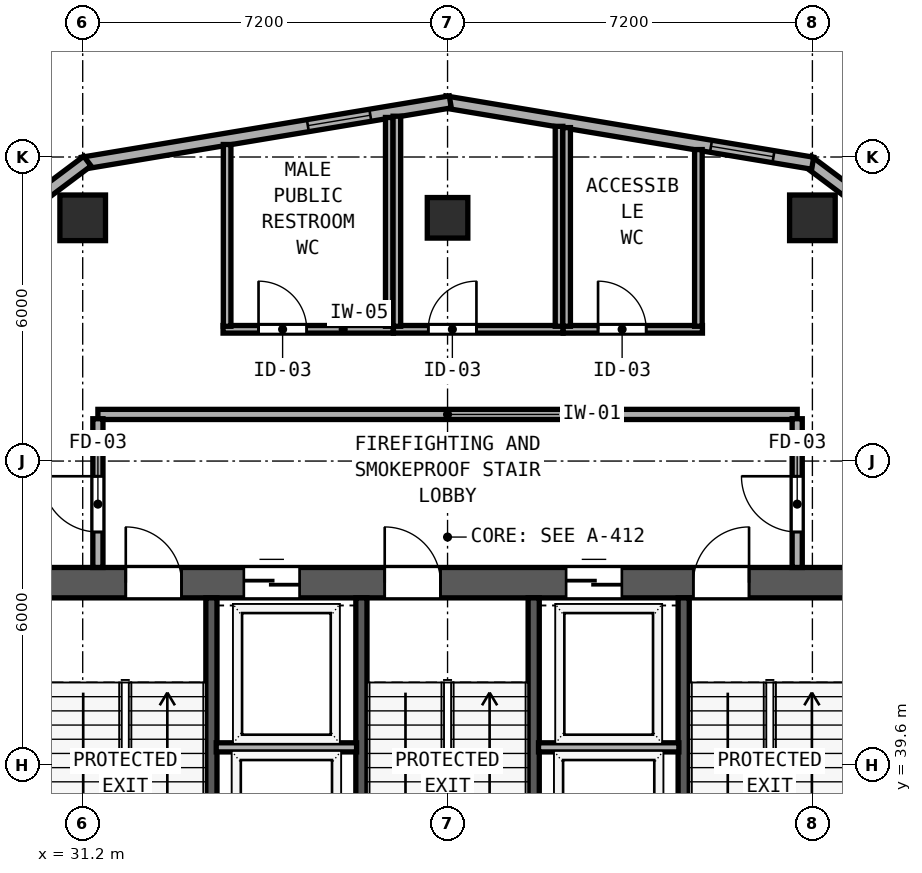
"""IFC4 building model, lengths in metres.
Left out: names, types, materials, properties, quantities, classifications, styles, units other than length and angle.
Written with IfcOpenShell. Run it as: python <this file> out.ifc"""

import sys

from ifc_helpers import new_model, si_unit, direction, frame, frame_2d, origin, origin_2d, place, context, subcontext, project, spatial, rectangle, hollow_rectangle, extrude, element, fill, save


model = new_model("IFC4")
c1 = context("Model", 3, precision=1e-05, world=origin(), true_north=direction((0.0, 1.0)))
c2 = subcontext(c1, "Body", "Model", "MODEL_VIEW")
j1 = project(units=[si_unit("LENGTHUNIT", "METRE"), si_unit("PLANEANGLEUNIT", "RADIAN")], contexts=[c1])
p1 = place(None, origin())
s1 = spatial("IfcSite", under=j1, at=p1, CompositionType="ELEMENT")
p2 = place(p1, origin())
s2 = spatial("IfcBuilding", under=s1, at=p2, CompositionType="ELEMENT")
p3 = place(p2, frame((0.0, 0.0, 164.6)))
s3 = spatial("IfcBuildingStorey", under=s2, at=p3, CompositionType="ELEMENT", Elevation=164.6)
p4 = place(p3, frame((29.7, 43.2, 0.0), z_axis=(0.0, 0.0, 1.0), x_axis=(1.0, 0.0, 0.0)))
e1 = element("IfcWall", 1, at=p4, inside=s3, PredefinedType="SHEAR", context=c2, shape_type="SweptSolid", body=[
    extrude(rectangle(XDim=17.4, YDim=0.6, at=frame_2d((8.7, 0.0))), origin(), (0.0, 0.0, 1.0), 4.22),
])
p5 = place(p4, frame((2.35, 0.0, 0.0)))
e2 = element("IfcOpeningElement", 2, at=p5, cuts=e1, PredefinedType="OPENING", context=c2, shape_type="SweptSolid", body=[
    extrude(rectangle(XDim=1.1, YDim=2.15, at=frame_2d((0.55, 1.075))), frame((0.0, 0.31, 0.0), z_axis=(0.0, -1.0, 0.0), x_axis=(1.0, 0.0, 0.0)), (0.0, 0.0, 1.0), 0.62),
])
p6 = place(p4, frame((7.46, 0.0, 0.0)))
e3 = element("IfcOpeningElement", 3, at=p6, cuts=e1, PredefinedType="OPENING", context=c2, shape_type="SweptSolid", body=[
    extrude(rectangle(XDim=1.1, YDim=2.15, at=frame_2d((0.55, 1.075))), frame((0.0, 0.31, 0.0), z_axis=(0.0, -1.0, 0.0), x_axis=(1.0, 0.0, 0.0)), (0.0, 0.0, 1.0), 0.62),
])
p7 = place(p4, frame((13.55, 0.0, 0.0)))
e4 = element("IfcOpeningElement", 4, at=p7, cuts=e1, PredefinedType="OPENING", context=c2, shape_type="SweptSolid", body=[
    extrude(rectangle(XDim=1.1, YDim=2.15, at=frame_2d((0.55, 1.075))), frame((0.0, 0.31, 0.0), z_axis=(0.0, -1.0, 0.0), x_axis=(1.0, 0.0, 0.0)), (0.0, 0.0, 1.0), 0.62),
])
p8 = place(p4, frame((4.68, 0.0, 0.0)))
e5 = element("IfcOpeningElement", 5, at=p8, cuts=e1, PredefinedType="OPENING", context=c2, shape_type="SweptSolid", body=[
    extrude(rectangle(XDim=1.1, YDim=2.2, at=frame_2d((0.55, 1.1))), frame((0.0, 0.31, 0.0), z_axis=(0.0, -1.0, 0.0), x_axis=(1.0, 0.0, 0.0)), (0.0, 0.0, 1.0), 0.62),
])
p9 = place(p4, frame((11.04, 0.0, 0.0)))
e6 = element("IfcOpeningElement", 6, at=p9, cuts=e1, PredefinedType="OPENING", context=c2, shape_type="SweptSolid", body=[
    extrude(rectangle(XDim=1.1, YDim=2.2, at=frame_2d((0.55, 1.1))), frame((0.0, 0.31, 0.0), z_axis=(0.0, -1.0, 0.0), x_axis=(1.0, 0.0, 0.0)), (0.0, 0.0, 1.0), 0.62),
])
for number, where, z_axis, x_axis in (
    (7, (33.74, 35.39, 0.0), (0.0, 0.0, 1.0), (0.0, 1.0, 0.0)),
    (8, (36.7, 35.39, 0.0), (0.0, 0.0, 1.0), (0.0, 1.0, 0.0)),
    (9, (40.1, 35.39, 0.0), (0.0, 0.0, 1.0), (0.0, 1.0, 0.0)),
    (10, (43.06, 35.39, 0.0), (0.0, 0.0, 1.0), (0.0, 1.0, 0.0)),
):
    element("IfcWall", number, at=place(p3, frame(where, z_axis=z_axis, x_axis=x_axis)), inside=s3, PredefinedType="SHEAR", context=c2, shape_type="SweptSolid", body=[
        extrude(rectangle(XDim=7.51, YDim=0.22, at=frame_2d((3.755, 0.0))), origin(), (0.0, 0.0, 1.0), 4.22),
    ])
for number, where, z_axis, x_axis in (
    (11, (31.2, 50.4, 0.0), (0.0, 0.0, 1.0), (1.0, 0.0, 0.0)),
    (12, (45.6, 50.4, 0.0), (0.0, 0.0, 1.0), (1.0, 0.0, 0.0)),
):
    element("IfcColumn", number, at=place(p3, frame(where, z_axis=z_axis, x_axis=x_axis)), inside=s3, PredefinedType="COLUMN", context=c2, shape_type="SweptSolid", body=[
        extrude(hollow_rectangle(XDim=0.9, YDim=0.9, WallThickness=0.034, at=origin_2d()), origin(), (0.0, 0.0, 1.0), 4.4),
    ])
p10 = place(p3, frame((38.4, 50.4, 0.0), z_axis=(0.0, 0.0, 1.0), x_axis=(1.0, 0.0, 0.0)))
e13 = element("IfcColumn", 13, at=p10, inside=s3, PredefinedType="COLUMN", context=c2, shape_type="SweptSolid", body=[
    extrude(hollow_rectangle(XDim=0.8, YDim=0.8, WallThickness=0.03, at=origin_2d()), origin(), (0.0, 0.0, 1.0), 4.4),
])
p11 = place(p3, frame((50.324, 47.907, 0.0), z_axis=(0.0, 0.0, 1.0), x_axis=(-0.80001459783, 0.599980535734, 0.0)))
e14 = element("IfcWall", 14, at=p11, inside=s3, PredefinedType="SOLIDWALL", context=c2, shape_type="SweptSolid", body=[
    extrude(rectangle(XDim=6.021, YDim=0.24, at=frame_2d((3.01, 0.0))), origin(), (0.0, 0.0, 1.0), 4.22),
])
p12 = place(p11, frame((1.6, 0.0, 0.85)))
e15 = element("IfcOpeningElement", 15, at=p12, cuts=e14, PredefinedType="OPENING", context=c2, shape_type="SweptSolid", body=[
    extrude(rectangle(XDim=1.25, YDim=1.95, at=frame_2d((0.625, 0.975))), frame((0.0, 0.13, 0.0), z_axis=(0.0, -1.0, 0.0), x_axis=(1.0, 0.0, 0.0)), (0.0, 0.0, 1.0), 0.26),
])
p13 = place(p3, frame((45.606, 51.477, 0.0), z_axis=(0.0, 0.0, 1.0), x_axis=(-0.986394820321, 0.164393608283, 0.0)))
e16 = element("IfcWall", 16, at=p13, inside=s3, PredefinedType="SOLIDWALL", context=c2, shape_type="SweptSolid", body=[
    extrude(rectangle(XDim=7.36, YDim=0.24, at=frame_2d((3.68, 0.0))), origin(), (0.0, 0.0, 1.0), 4.22),
])
p14 = place(p13, frame((0.784, 0.0, 0.85)))
e17 = element("IfcOpeningElement", 17, at=p14, cuts=e16, PredefinedType="OPENING", context=c2, shape_type="SweptSolid", body=[
    extrude(rectangle(XDim=1.25, YDim=1.95, at=frame_2d((0.625, 0.975))), frame((0.0, 0.13, 0.0), z_axis=(0.0, -1.0, 0.0), x_axis=(1.0, 0.0, 0.0)), (0.0, 0.0, 1.0), 0.26),
])
p15 = place(p3, frame((38.454, 52.687, 0.0), z_axis=(0.0, 0.0, 1.0), x_axis=(-0.986394820321, -0.164393608283, 0.0)))
e18 = element("IfcWall", 18, at=p15, inside=s3, PredefinedType="SOLIDWALL", context=c2, shape_type="SweptSolid", body=[
    extrude(rectangle(XDim=7.36, YDim=0.24, at=frame_2d((3.68, 0.0))), origin(), (0.0, 0.0, 1.0), 4.22),
])
p16 = place(p15, frame((1.6, 0.0, 0.85)))
e19 = element("IfcOpeningElement", 19, at=p16, cuts=e18, PredefinedType="OPENING", context=c2, shape_type="SweptSolid", body=[
    extrude(rectangle(XDim=1.25, YDim=1.95, at=frame_2d((0.625, 0.975))), frame((0.0, 0.13, 0.0), z_axis=(0.0, -1.0, 0.0), x_axis=(1.0, 0.0, 0.0)), (0.0, 0.0, 1.0), 0.26),
])
p17 = place(p3, frame((31.292, 51.519, 0.0), z_axis=(0.0, 0.0, 1.0), x_axis=(-0.8, -0.6, 0.0)))
e20 = element("IfcWall", 20, at=p17, inside=s3, PredefinedType="SOLIDWALL", context=c2, shape_type="SweptSolid", body=[
    extrude(rectangle(XDim=6.021, YDim=0.24, at=frame_2d((3.01, 0.0))), origin(), (0.0, 0.0, 1.0), 4.22),
])
p18 = place(p17, frame((1.6, 0.0, 0.85)))
e21 = element("IfcOpeningElement", 21, at=p18, cuts=e20, PredefinedType="OPENING", context=c2, shape_type="SweptSolid", body=[
    extrude(rectangle(XDim=1.25, YDim=1.95, at=frame_2d((0.625, 0.975))), frame((0.0, 0.13, 0.0), z_axis=(0.0, -1.0, 0.0), x_axis=(1.0, 0.0, 0.0)), (0.0, 0.0, 1.0), 0.26),
])
p19 = place(p3, frame((31.5, 46.52, 0.0), z_axis=(0.0, 0.0, 1.0), x_axis=(1.0, 0.0, 0.0)))
e22 = element("IfcWall", 22, at=p19, inside=s3, PredefinedType="SOLIDWALL", context=c2, shape_type="SweptSolid", body=[
    extrude(rectangle(XDim=13.8, YDim=0.2, at=frame_2d((6.9, 0.0))), origin(), (0.0, 0.0, 1.0), 4.22),
])
p20 = place(p3, frame((31.5, 43.5, 0.0), z_axis=(0.0, 0.0, 1.0), x_axis=(0.0, 1.0, 0.0)))
e23 = element("IfcWall", 23, at=p20, inside=s3, PredefinedType="SOLIDWALL", context=c2, shape_type="SweptSolid", body=[
    extrude(rectangle(XDim=2.935, YDim=0.2, at=frame_2d((1.468, 0.0))), origin(), (0.0, 0.0, 1.0), 4.22),
])
p21 = place(p20, frame((1.8, 0.0, 0.0), z_axis=(0.0, 0.0, 1.0), x_axis=(-1.0, 0.0, 0.0)))
e24 = element("IfcOpeningElement", 24, at=p21, cuts=e23, PredefinedType="OPENING", context=c2, shape_type="SweptSolid", body=[
    extrude(rectangle(XDim=1.1, YDim=2.15, at=frame_2d((0.55, 1.075))), frame((0.0, 0.11, 0.0), z_axis=(0.0, -1.0, 0.0), x_axis=(1.0, 0.0, 0.0)), (0.0, 0.0, 1.0), 0.22),
])
p22 = place(p3, frame((45.3, 43.5, 0.0), z_axis=(0.0, 0.0, 1.0), x_axis=(0.0, 1.0, 0.0)))
e25 = element("IfcWall", 25, at=p22, inside=s3, PredefinedType="SOLIDWALL", context=c2, shape_type="SweptSolid", body=[
    extrude(rectangle(XDim=2.935, YDim=0.2, at=frame_2d((1.468, 0.0))), origin(), (0.0, 0.0, 1.0), 4.22),
])
p23 = place(p22, frame((0.7, 0.0, 0.0)))
e26 = element("IfcOpeningElement", 26, at=p23, cuts=e25, PredefinedType="OPENING", context=c2, shape_type="SweptSolid", body=[
    extrude(rectangle(XDim=1.1, YDim=2.15, at=frame_2d((0.55, 1.075))), frame((0.0, 0.11, 0.0), z_axis=(0.0, -1.0, 0.0), x_axis=(1.0, 0.0, 0.0)), (0.0, 0.0, 1.0), 0.22),
])
for number, where, z_axis, x_axis in (
    (27, (33.835, 39.95, 0.0), (0.0, 0.0, 1.0), (1.0, 0.0, 0.0)),
    (28, (40.195, 39.95, 0.0), (0.0, 0.0, 1.0), (1.0, 0.0, 0.0)),
):
    element("IfcWall", number, at=place(p3, frame(where, z_axis=z_axis, x_axis=x_axis)), inside=s3, PredefinedType="SOLIDWALL", context=c2, shape_type="SweptSolid", body=[
        extrude(rectangle(XDim=2.77, YDim=0.18, at=frame_2d((1.385, 0.0))), origin(), (0.0, 0.0, 1.0), 4.22),
    ])
p24 = place(p3, frame((33.97, 48.2, 0.0), z_axis=(0.0, 0.0, 1.0), x_axis=(1.0, 0.0, 0.0)))
e29 = element("IfcWall", 29, at=p24, inside=s3, PredefinedType="PARTITIONING", context=c2, shape_type="SweptSolid", body=[
    extrude(rectangle(XDim=3.36, YDim=0.15, at=frame_2d((1.68, 0.0))), origin(), (0.0, 0.0, 1.0), 4.22),
])
p25 = place(p24, frame((0.7, 0.0, 0.0)))
e30 = element("IfcOpeningElement", 30, at=p25, cuts=e29, PredefinedType="OPENING", context=c2, shape_type="SweptSolid", body=[
    extrude(rectangle(XDim=0.95, YDim=2.12, at=frame_2d((0.475, 1.06))), frame((0.0, 0.085, 0.0), z_axis=(0.0, -1.0, 0.0), x_axis=(1.0, 0.0, 0.0)), (0.0, 0.0, 1.0), 0.17),
])
p26 = place(p3, frame((34.05, 48.26, 0.0), z_axis=(0.0, 0.0, 1.0), x_axis=(0.0, 1.0, 0.0)))
e31 = element("IfcWall", 31, at=p26, inside=s3, PredefinedType="PARTITIONING", context=c2, shape_type="SweptSolid", body=[
    extrude(rectangle(XDim=3.587, YDim=0.15, at=frame_2d((1.793, 0.0))), origin(), (0.0, 0.0, 1.0), 4.22),
])
p27 = place(p3, frame((37.25, 48.26, 0.0), z_axis=(0.0, 0.0, 1.0), x_axis=(0.0, 1.0, 0.0)))
e32 = element("IfcWall", 32, at=p27, inside=s3, PredefinedType="PARTITIONING", context=c2, shape_type="SweptSolid", body=[
    extrude(rectangle(XDim=4.12, YDim=0.15, at=frame_2d((2.06, 0.0))), origin(), (0.0, 0.0, 1.0), 4.22),
])
p28 = place(p3, frame((37.332, 48.2, 0.0), z_axis=(0.0, 0.0, 1.0), x_axis=(1.0, 0.0, 0.0)))
e33 = element("IfcWall", 33, at=p28, inside=s3, PredefinedType="PARTITIONING", context=c2, shape_type="SweptSolid", body=[
    extrude(rectangle(XDim=3.348, YDim=0.15, at=frame_2d((1.674, 0.0))), origin(), (0.0, 0.0, 1.0), 4.22),
])
p29 = place(p28, frame((0.688, 0.0, 0.0)))
e34 = element("IfcOpeningElement", 34, at=p29, cuts=e33, PredefinedType="OPENING", context=c2, shape_type="SweptSolid", body=[
    extrude(rectangle(XDim=0.95, YDim=2.12, at=frame_2d((0.475, 1.06))), frame((0.0, 0.085, 0.0), z_axis=(0.0, -1.0, 0.0), x_axis=(1.0, 0.0, 0.0)), (0.0, 0.0, 1.0), 0.17),
])
p30 = place(p3, frame((37.4, 48.26, 0.0), z_axis=(0.0, 0.0, 1.0), x_axis=(0.0, 1.0, 0.0)))
e35 = element("IfcWall", 35, at=p30, inside=s3, PredefinedType="PARTITIONING", context=c2, shape_type="SweptSolid", body=[
    extrude(rectangle(XDim=4.145, YDim=0.15, at=frame_2d((2.073, 0.0))), origin(), (0.0, 0.0, 1.0), 4.22),
])
p31 = place(p3, frame((40.6, 48.26, 0.0), z_axis=(0.0, 0.0, 1.0), x_axis=(0.0, 1.0, 0.0)))
e36 = element("IfcWall", 36, at=p31, inside=s3, PredefinedType="PARTITIONING", context=c2, shape_type="SweptSolid", body=[
    extrude(rectangle(XDim=3.945, YDim=0.15, at=frame_2d((1.973, 0.0))), origin(), (0.0, 0.0, 1.0), 4.22),
])
p32 = place(p3, frame((40.682, 48.2, 0.0), z_axis=(0.0, 0.0, 1.0), x_axis=(1.0, 0.0, 0.0)))
e37 = element("IfcWall", 37, at=p32, inside=s3, PredefinedType="PARTITIONING", context=c2, shape_type="SweptSolid", body=[
    extrude(rectangle(XDim=2.748, YDim=0.15, at=frame_2d((1.374, 0.0))), origin(), (0.0, 0.0, 1.0), 4.22),
])
p33 = place(p32, frame((0.688, 0.0, 0.0)))
e38 = element("IfcOpeningElement", 38, at=p33, cuts=e37, PredefinedType="OPENING", context=c2, shape_type="SweptSolid", body=[
    extrude(rectangle(XDim=0.95, YDim=2.12, at=frame_2d((0.475, 1.06))), frame((0.0, 0.085, 0.0), z_axis=(0.0, -1.0, 0.0), x_axis=(1.0, 0.0, 0.0)), (0.0, 0.0, 1.0), 0.17),
])
p34 = place(p3, frame((40.75, 48.26, 0.0), z_axis=(0.0, 0.0, 1.0), x_axis=(0.0, 1.0, 0.0)))
e39 = element("IfcWall", 39, at=p34, inside=s3, PredefinedType="PARTITIONING", context=c2, shape_type="SweptSolid", body=[
    extrude(rectangle(XDim=3.92, YDim=0.15, at=frame_2d((1.96, 0.0))), origin(), (0.0, 0.0, 1.0), 4.22),
])
p35 = place(p3, frame((43.35, 48.26, 0.0), z_axis=(0.0, 0.0, 1.0), x_axis=(0.0, 1.0, 0.0)))
e40 = element("IfcWall", 40, at=p35, inside=s3, PredefinedType="PARTITIONING", context=c2, shape_type="SweptSolid", body=[
    extrude(rectangle(XDim=3.487, YDim=0.15, at=frame_2d((1.743, 0.0))), origin(), (0.0, 0.0, 1.0), 4.22),
])
p36 = place(p14, origin())
e41 = element("IfcWindow", 41, at=p36, inside=s3, PartitioningType="SINGLE_PANEL", PredefinedType="WINDOW", context=c2, shape_type="SweptSolid", body=[
    extrude(rectangle(XDim=1.25, YDim=1.95, at=frame_2d((0.625, 0.975))), frame((0.0, 0.03, 0.0), z_axis=(0.0, -1.0, 0.0), x_axis=(1.0, 0.0, 0.0)), (0.0, 0.0, 1.0), 0.06),
])
fill(e17, e41)
p37 = place(p16, origin())
e42 = element("IfcWindow", 42, at=p37, inside=s3, PartitioningType="SINGLE_PANEL", PredefinedType="WINDOW", context=c2, shape_type="SweptSolid", body=[
    extrude(rectangle(XDim=1.25, YDim=1.95, at=frame_2d((0.625, 0.975))), frame((0.0, 0.03, 0.0), z_axis=(0.0, -1.0, 0.0), x_axis=(1.0, 0.0, 0.0)), (0.0, 0.0, 1.0), 0.06),
])
fill(e19, e42)
p38 = place(p5, origin())
e43 = element("IfcDoor", 43, at=p38, inside=s3, OperationType="SINGLE_SWING_LEFT", PredefinedType="DOOR", context=c2, shape_type="SweptSolid", body=[
    extrude(rectangle(XDim=1.1, YDim=2.15, at=frame_2d((0.55, 1.075))), frame((0.0, 0.185, 0.0), z_axis=(0.0, -1.0, 0.0), x_axis=(1.0, 0.0, 0.0)), (0.0, 0.0, 1.0), 0.05),
])
fill(e2, e43)
p39 = place(p6, origin())
e44 = element("IfcDoor", 44, at=p39, inside=s3, OperationType="SINGLE_SWING_LEFT", PredefinedType="DOOR", context=c2, shape_type="SweptSolid", body=[
    extrude(rectangle(XDim=1.1, YDim=2.15, at=frame_2d((0.55, 1.075))), frame((0.0, 0.185, 0.0), z_axis=(0.0, -1.0, 0.0), x_axis=(1.0, 0.0, 0.0)), (0.0, 0.0, 1.0), 0.05),
])
fill(e3, e44)
p40 = place(p7, origin())
e45 = element("IfcDoor", 45, at=p40, inside=s3, OperationType="SINGLE_SWING_RIGHT", PredefinedType="DOOR", context=c2, shape_type="SweptSolid", body=[
    extrude(rectangle(XDim=1.1, YDim=2.15, at=frame_2d((0.55, 1.075))), frame((0.0, 0.185, 0.0), z_axis=(0.0, -1.0, 0.0), x_axis=(1.0, 0.0, 0.0)), (0.0, 0.0, 1.0), 0.05),
])
fill(e4, e45)
p41 = place(p21, origin())
e46 = element("IfcDoor", 46, at=p41, inside=s3, OperationType="SINGLE_SWING_LEFT", PredefinedType="DOOR", context=c2, shape_type="SweptSolid", body=[
    extrude(rectangle(XDim=1.1, YDim=2.15, at=frame_2d((0.55, 1.075))), frame((0.0, 0.025, 0.0), z_axis=(0.0, -1.0, 0.0), x_axis=(1.0, 0.0, 0.0)), (0.0, 0.0, 1.0), 0.05),
])
fill(e24, e46)
p42 = place(p23, origin())
e47 = element("IfcDoor", 47, at=p42, inside=s3, OperationType="SINGLE_SWING_RIGHT", PredefinedType="DOOR", context=c2, shape_type="SweptSolid", body=[
    extrude(rectangle(XDim=1.1, YDim=2.15, at=frame_2d((0.55, 1.075))), frame((0.0, 0.025, 0.0), z_axis=(0.0, -1.0, 0.0), x_axis=(1.0, 0.0, 0.0)), (0.0, 0.0, 1.0), 0.05),
])
fill(e26, e47)
p43 = place(p8, origin())
e48 = element("IfcDoor", 48, at=p43, inside=s3, OperationType="SLIDING_TO_LEFT", PredefinedType="DOOR", context=c2, shape_type="SweptSolid", body=[
    extrude(rectangle(XDim=1.1, YDim=2.2, at=frame_2d((0.55, 1.1))), frame((0.0, 0.185, 0.0), z_axis=(0.0, -1.0, 0.0), x_axis=(1.0, 0.0, 0.0)), (0.0, 0.0, 1.0), 0.05),
])
fill(e5, e48)
p44 = place(p9, origin())
e49 = element("IfcDoor", 49, at=p44, inside=s3, OperationType="SLIDING_TO_LEFT", PredefinedType="DOOR", context=c2, shape_type="SweptSolid", body=[
    extrude(rectangle(XDim=1.1, YDim=2.2, at=frame_2d((0.55, 1.1))), frame((0.0, 0.185, 0.0), z_axis=(0.0, -1.0, 0.0), x_axis=(1.0, 0.0, 0.0)), (0.0, 0.0, 1.0), 0.05),
])
fill(e6, e49)
p45 = place(p25, origin())
e50 = element("IfcDoor", 50, at=p45, inside=s3, OperationType="SINGLE_SWING_LEFT", PredefinedType="DOOR", context=c2, shape_type="SweptSolid", body=[
    extrude(rectangle(XDim=0.95, YDim=2.12, at=frame_2d((0.475, 1.06))), frame((0.0, 0.025, 0.0), z_axis=(0.0, -1.0, 0.0), x_axis=(1.0, 0.0, 0.0)), (0.0, 0.0, 1.0), 0.05),
])
fill(e30, e50)
p46 = place(p29, origin())
e51 = element("IfcDoor", 51, at=p46, inside=s3, OperationType="SINGLE_SWING_RIGHT", PredefinedType="DOOR", context=c2, shape_type="SweptSolid", body=[
    extrude(rectangle(XDim=0.95, YDim=2.12, at=frame_2d((0.475, 1.06))), frame((0.0, 0.025, 0.0), z_axis=(0.0, -1.0, 0.0), x_axis=(1.0, 0.0, 0.0)), (0.0, 0.0, 1.0), 0.05),
])
fill(e34, e51)
p47 = place(p33, origin())
e52 = element("IfcDoor", 52, at=p47, inside=s3, OperationType="SINGLE_SWING_LEFT", PredefinedType="DOOR", context=c2, shape_type="SweptSolid", body=[
    extrude(rectangle(XDim=0.95, YDim=2.12, at=frame_2d((0.475, 1.06))), frame((0.0, 0.025, 0.0), z_axis=(0.0, -1.0, 0.0), x_axis=(1.0, 0.0, 0.0)), (0.0, 0.0, 1.0), 0.05),
])
fill(e38, e52)
save(model, sys.argv[1])
